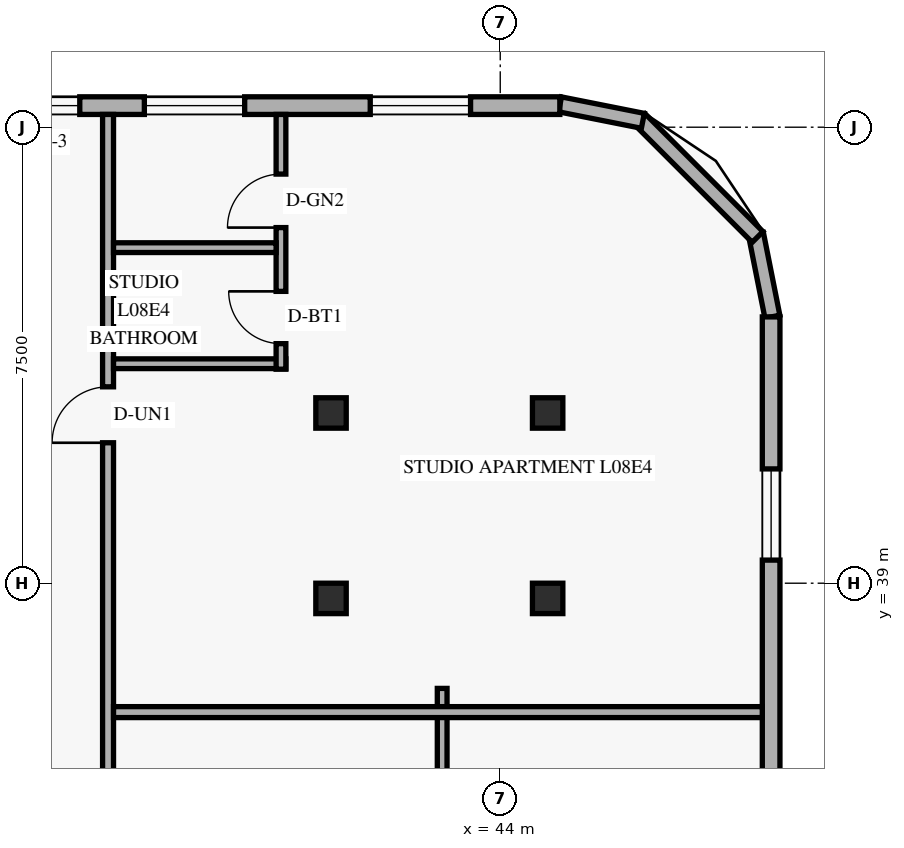
"""IFC4 building model, lengths in metres.
Left out: names, types, materials, properties, quantities, classifications, styles, units other than length and angle.
Written with IfcOpenShell. Run it as: python <this file> out.ifc"""

import sys

from ifc_helpers import new_model, si_unit, direction, frame, frame_2d, origin, origin_2d, place, context, subcontext, project, spatial, rectangle, hollow_rectangle, extrude, element, fill, save


model = new_model("IFC4")
c1 = context("Model", 3, precision=1e-05, world=origin(), true_north=direction((0.0, 1.0)))
c2 = subcontext(c1, "Body", "Model", "MODEL_VIEW")
j1 = project(units=[si_unit("LENGTHUNIT", "METRE"), si_unit("PLANEANGLEUNIT", "RADIAN")], contexts=[c1])
p1 = place(None, origin())
s1 = spatial("IfcSite", under=j1, at=p1, CompositionType="ELEMENT")
p2 = place(p1, origin())
s2 = spatial("IfcBuilding", under=s1, at=p2, CompositionType="ELEMENT")
p3 = place(p2, frame((0.0, 0.0, 34.8)))
s3 = spatial("IfcBuildingStorey", under=s2, at=p3, CompositionType="ELEMENT", Elevation=34.8)
for number, where, z_axis, x_axis in (
    (1, (41.154, 38.75, 0.0), (0.035, 0.0, 0.999), (0.0, 1.0, 0.0)),
    (2, (41.154, 41.8, 0.0), (0.035, 0.0, 0.999), (0.0, 1.0, 0.0)),
):
    element("IfcColumn", number, at=place(p3, frame(where, z_axis=z_axis, x_axis=x_axis)), inside=s3, PredefinedType="COLUMN", context=c2, shape_type="SweptSolid", body=[
        extrude(hollow_rectangle(XDim=0.5, YDim=0.5, WallThickness=0.022, at=origin_2d()), origin(), (0.0, 0.0, 1.0), 3.602),
    ])
for number, where, z_axis, x_axis in (
    (3, (44.675, 38.75, 0.0), (0.058, 0.0, 0.998), (0.0, 1.0, 0.0)),
    (4, (44.675, 41.8, 0.0), (0.058, 0.0, 0.998), (0.0, 1.0, 0.0)),
):
    element("IfcColumn", number, at=place(p3, frame(where, z_axis=z_axis, x_axis=x_axis)), inside=s3, PredefinedType="COLUMN", context=c2, shape_type="SweptSolid", body=[
        extrude(hollow_rectangle(XDim=0.5, YDim=0.5, WallThickness=0.022, at=origin_2d()), origin(), (0.0, 0.0, 1.0), 3.606),
    ])
p4 = place(p3, frame((48.476, 43.384, 0.0), z_axis=(0.0, 0.0, 1.0), x_axis=(-0.19496651342, 0.980809899341, 0.0)))
e5 = element("IfcWall", 5, at=p4, inside=s3, PredefinedType="SOLIDWALL", context=c2, shape_type="SweptSolid", body=[
    extrude(rectangle(XDim=1.389, YDim=0.25, at=frame_2d((0.694, 0.0))), origin(), (0.0, 0.0, 1.0), 3.36),
])
p5 = place(p3, frame((48.232, 44.695, 0.0), z_axis=(0.0, 0.0, 1.0), x_axis=(-0.707106781187, 0.707106781187, 0.0)))
e6 = element("IfcWall", 6, at=p5, inside=s3, PredefinedType="SOLIDWALL", context=c2, shape_type="SweptSolid", body=[
    extrude(rectangle(XDim=2.739, YDim=0.25, at=frame_2d((1.37, 0.0))), origin(), (0.0, 0.0, 1.0), 3.36),
])
p6 = place(p3, frame((46.345, 46.605, 0.0), z_axis=(0.0, 0.0, 1.0), x_axis=(-0.980809899341, 0.19496651342, 0.0)))
e7 = element("IfcWall", 7, at=p6, inside=s3, PredefinedType="SOLIDWALL", context=c2, shape_type="SweptSolid", body=[
    extrude(rectangle(XDim=1.389, YDim=0.25, at=frame_2d((0.694, 0.0))), origin(), (0.0, 0.0, 1.0), 3.36),
])
p7 = place(p3, frame((48.455, 29.4, 0.0), z_axis=(0.0, 0.0, 1.0), x_axis=(0.0, 1.0, 0.0)))
e8 = element("IfcWall", 8, at=p7, inside=s3, PredefinedType="SOLIDWALL", context=c2, shape_type="SweptSolid", body=[
    extrude(rectangle(XDim=13.98, YDim=0.29, at=frame_2d((6.99, 0.0))), origin(), (0.0, 0.0, 1.0), 3.36),
])
p8 = place(p7, frame((0.995, 0.0, 0.85)))
e9 = element("IfcOpeningElement", 9, at=p8, cuts=e8, PredefinedType="OPENING", context=c2, shape_type="SweptSolid", body=[
    extrude(rectangle(XDim=1.5, YDim=1.55, at=frame_2d((0.75, 0.775))), frame((0.0, 0.155, 0.0), z_axis=(0.0, -1.0, 0.0), x_axis=(1.0, 0.0, 0.0)), (0.0, 0.0, 1.0), 0.31),
])
p9 = place(p7, frame((4.735, 0.0, 0.85)))
e10 = element("IfcOpeningElement", 10, at=p9, cuts=e8, PredefinedType="OPENING", context=c2, shape_type="SweptSolid", body=[
    extrude(rectangle(XDim=1.5, YDim=1.55, at=frame_2d((0.75, 0.775))), frame((0.0, 0.155, 0.0), z_axis=(0.0, -1.0, 0.0), x_axis=(1.0, 0.0, 0.0)), (0.0, 0.0, 1.0), 0.31),
])
p10 = place(p7, frame((9.98, 0.0, 0.85)))
e11 = element("IfcOpeningElement", 11, at=p10, cuts=e8, PredefinedType="OPENING", context=c2, shape_type="SweptSolid", body=[
    extrude(rectangle(XDim=1.5, YDim=1.55, at=frame_2d((0.75, 0.775))), frame((0.0, 0.155, 0.0), z_axis=(0.0, -1.0, 0.0), x_axis=(1.0, 0.0, 0.0)), (0.0, 0.0, 1.0), 0.31),
])
p11 = place(p3, frame((44.98, 46.855, 0.0), z_axis=(0.0, 0.0, 1.0), x_axis=(-1.0, 0.0, 0.0)))
e12 = element("IfcWall", 12, at=p11, inside=s3, PredefinedType="SOLIDWALL", context=c2, shape_type="SweptSolid", body=[
    extrude(rectangle(XDim=39.56, YDim=0.29, at=frame_2d((19.78, 0.0))), origin(), (0.0, 0.0, 1.0), 3.36),
])
p12 = place(p11, frame((35.295, 0.0, 0.85)))
e13 = element("IfcOpeningElement", 13, at=p12, cuts=e12, PredefinedType="OPENING", context=c2, shape_type="SweptSolid", body=[
    extrude(rectangle(XDim=1.65, YDim=1.6, at=frame_2d((0.825, 0.8))), frame((0.0, 0.155, 0.0), z_axis=(0.0, -1.0, 0.0), x_axis=(1.0, 0.0, 0.0)), (0.0, 0.0, 1.0), 0.31),
])
p13 = place(p11, frame((31.18, 0.0, 0.85)))
e14 = element("IfcOpeningElement", 14, at=p13, cuts=e12, PredefinedType="OPENING", context=c2, shape_type="SweptSolid", body=[
    extrude(rectangle(XDim=1.2, YDim=1.5, at=frame_2d((0.6, 0.75))), frame((0.0, 0.155, 0.0), z_axis=(0.0, -1.0, 0.0), x_axis=(1.0, 0.0, 0.0)), (0.0, 0.0, 1.0), 0.31),
])
p14 = place(p11, frame((25.684, 0.0, 0.85)))
e15 = element("IfcOpeningElement", 15, at=p14, cuts=e12, PredefinedType="OPENING", context=c2, shape_type="SweptSolid", body=[
    extrude(rectangle(XDim=1.65, YDim=1.6, at=frame_2d((0.825, 0.8))), frame((0.0, 0.155, 0.0), z_axis=(0.0, -1.0, 0.0), x_axis=(1.0, 0.0, 0.0)), (0.0, 0.0, 1.0), 0.31),
])
p15 = place(p11, frame((18.649, 0.0, 0.85)))
e16 = element("IfcOpeningElement", 16, at=p15, cuts=e12, PredefinedType="OPENING", context=c2, shape_type="SweptSolid", body=[
    extrude(rectangle(XDim=1.65, YDim=1.6, at=frame_2d((0.825, 0.8))), frame((0.0, 0.155, 0.0), z_axis=(0.0, -1.0, 0.0), x_axis=(1.0, 0.0, 0.0)), (0.0, 0.0, 1.0), 0.31),
])
p16 = place(p11, frame((12.359, 0.0, 0.85)))
e17 = element("IfcOpeningElement", 17, at=p16, cuts=e12, PredefinedType="OPENING", context=c2, shape_type="SweptSolid", body=[
    extrude(rectangle(XDim=1.65, YDim=1.6, at=frame_2d((0.825, 0.8))), frame((0.0, 0.155, 0.0), z_axis=(0.0, -1.0, 0.0), x_axis=(1.0, 0.0, 0.0)), (0.0, 0.0, 1.0), 0.31),
])
p17 = place(p11, frame((7.895, 0.0, 0.85)))
e18 = element("IfcOpeningElement", 18, at=p17, cuts=e12, PredefinedType="OPENING", context=c2, shape_type="SweptSolid", body=[
    extrude(rectangle(XDim=1.2, YDim=1.5, at=frame_2d((0.6, 0.75))), frame((0.0, 0.155, 0.0), z_axis=(0.0, -1.0, 0.0), x_axis=(1.0, 0.0, 0.0)), (0.0, 0.0, 1.0), 0.31),
])
p18 = place(p11, frame((5.183, 0.0, 0.85)))
e19 = element("IfcOpeningElement", 19, at=p18, cuts=e12, PredefinedType="OPENING", context=c2, shape_type="SweptSolid", body=[
    extrude(rectangle(XDim=1.65, YDim=1.6, at=frame_2d((0.825, 0.8))), frame((0.0, 0.155, 0.0), z_axis=(0.0, -1.0, 0.0), x_axis=(1.0, 0.0, 0.0)), (0.0, 0.0, 1.0), 0.31),
])
p19 = place(p11, frame((1.468, 0.0, 0.85)))
e20 = element("IfcOpeningElement", 20, at=p19, cuts=e12, PredefinedType="OPENING", context=c2, shape_type="SweptSolid", body=[
    extrude(rectangle(XDim=1.65, YDim=1.6, at=frame_2d((0.825, 0.8))), frame((0.0, 0.155, 0.0), z_axis=(0.0, -1.0, 0.0), x_axis=(1.0, 0.0, 0.0)), (0.0, 0.0, 1.0), 0.31),
])
p20 = place(p3, frame((37.55, 1.29, 0.0), z_axis=(0.0, 0.0, 1.0), x_axis=(0.0, 1.0, 0.0)))
e21 = element("IfcWall", 21, at=p20, inside=s3, PredefinedType="STANDARD", context=c2, shape_type="SweptSolid", body=[
    extrude(rectangle(XDim=45.42, YDim=0.18, at=frame_2d((22.71, 0.0))), origin(), (0.0, 0.0, 1.0), 2.649),
])
p21 = place(p20, frame((4.46, 0.0, 0.0)))
e22 = element("IfcOpeningElement", 22, at=p21, cuts=e21, PredefinedType="OPENING", context=c2, shape_type="SweptSolid", body=[
    extrude(rectangle(XDim=0.92, YDim=2.15, at=frame_2d((0.46, 1.075))), frame((0.0, 0.1, 0.0), z_axis=(0.0, -1.0, 0.0), x_axis=(1.0, 0.0, 0.0)), (0.0, 0.0, 1.0), 0.2),
])
p22 = place(p20, frame((15.907, 0.0, 0.0)))
e23 = element("IfcOpeningElement", 23, at=p22, cuts=e21, PredefinedType="OPENING", context=c2, shape_type="SweptSolid", body=[
    extrude(rectangle(XDim=0.92, YDim=2.15, at=frame_2d((0.46, 1.075))), frame((0.0, 0.1, 0.0), z_axis=(0.0, -1.0, 0.0), x_axis=(1.0, 0.0, 0.0)), (0.0, 0.0, 1.0), 0.2),
])
p23 = place(p20, frame((28.23, 0.0, 0.0)))
e24 = element("IfcOpeningElement", 24, at=p23, cuts=e21, PredefinedType="OPENING", context=c2, shape_type="SweptSolid", body=[
    extrude(rectangle(XDim=0.92, YDim=2.15, at=frame_2d((0.46, 1.075))), frame((0.0, 0.1, 0.0), z_axis=(0.0, -1.0, 0.0), x_axis=(1.0, 0.0, 0.0)), (0.0, 0.0, 1.0), 0.2),
])
p24 = place(p20, frame((40.02, 0.0, 0.0)))
e25 = element("IfcOpeningElement", 25, at=p24, cuts=e21, PredefinedType="OPENING", context=c2, shape_type="SweptSolid", body=[
    extrude(rectangle(XDim=0.92, YDim=2.15, at=frame_2d((0.46, 1.075))), frame((0.0, 0.1, 0.0), z_axis=(0.0, -1.0, 0.0), x_axis=(1.0, 0.0, 0.0)), (0.0, 0.0, 1.0), 0.2),
])
p25 = place(p3, frame((43.045, 32.81, 0.0), z_axis=(0.0, 0.0, 1.0), x_axis=(0.0, 1.0, 0.0)))
e26 = element("IfcWall", 26, at=p25, inside=s3, PredefinedType="PARTITIONING", context=c2, shape_type="SweptSolid", body=[
    extrude(rectangle(XDim=4.46, YDim=0.16, at=frame_2d((2.23, 0.0))), origin(), (0.0, 0.0, 1.0), 2.932),
])
p26 = place(p3, frame((37.64, 36.88, 0.0), z_axis=(0.0, 0.0, 1.0), x_axis=(1.0, 0.0, 0.0)))
e27 = element("IfcWall", 27, at=p26, inside=s3, PredefinedType="PARTITIONING", context=c2, shape_type="SweptSolid", body=[
    extrude(rectangle(XDim=10.67, YDim=0.18, at=frame_2d((5.335, 0.0))), origin(), (0.0, 0.0, 1.0), 2.649),
])
p27 = place(p3, frame((37.64, 42.61, 0.0), z_axis=(0.0, 0.0, 1.0), x_axis=(1.0, 0.0, 0.0)))
e28 = element("IfcWall", 28, at=p27, inside=s3, PredefinedType="PLUMBINGWALL", context=c2, shape_type="SweptSolid", body=[
    extrude(rectangle(XDim=2.834, YDim=0.16, at=frame_2d((1.417, 0.0))), origin(), (0.0, 0.0, 1.0), 3.36),
])
p28 = place(p3, frame((40.394, 42.52, 0.0), z_axis=(0.0, 0.0, 1.0), x_axis=(0.0, 1.0, 0.0)))
e29 = element("IfcWall", 29, at=p28, inside=s3, PredefinedType="PLUMBINGWALL", context=c2, shape_type="SweptSolid", body=[
    extrude(rectangle(XDim=4.19, YDim=0.16, at=frame_2d((2.095, 0.0))), origin(), (0.0, 0.0, 1.0), 3.36),
])
p29 = place(p28, frame((0.42, 0.0, 0.0)))
e30 = element("IfcOpeningElement", 30, at=p29, cuts=e29, PredefinedType="OPENING", context=c2, shape_type="SweptSolid", body=[
    extrude(rectangle(XDim=0.86, YDim=2.12, at=frame_2d((0.43, 1.06))), frame((0.0, 0.09, 0.0), z_axis=(0.0, -1.0, 0.0), x_axis=(1.0, 0.0, 0.0)), (0.0, 0.0, 1.0), 0.18),
])
p30 = place(p28, frame((2.329, 0.0, 0.0)))
e31 = element("IfcOpeningElement", 31, at=p30, cuts=e29, PredefinedType="OPENING", context=c2, shape_type="SweptSolid", body=[
    extrude(rectangle(XDim=0.88, YDim=2.12, at=frame_2d((0.44, 1.06))), frame((0.0, 0.09, 0.0), z_axis=(0.0, -1.0, 0.0), x_axis=(1.0, 0.0, 0.0)), (0.0, 0.0, 1.0), 0.18),
])
p31 = place(p3, frame((37.64, 44.519, 0.0), z_axis=(0.0, 0.0, 1.0), x_axis=(1.0, 0.0, 0.0)))
e32 = element("IfcWall", 32, at=p31, inside=s3, PredefinedType="PLUMBINGWALL", context=c2, shape_type="SweptSolid", body=[
    extrude(rectangle(XDim=2.674, YDim=0.16, at=frame_2d((1.337, 0.0))), origin(), (0.0, 0.0, 1.0), 3.36),
])
p32 = place(p10, origin())
e33 = element("IfcWindow", 33, at=p32, inside=s3, PartitioningType="SINGLE_PANEL", PredefinedType="WINDOW", context=c2, shape_type="SweptSolid", body=[
    extrude(rectangle(XDim=1.5, YDim=1.55, at=frame_2d((0.75, 0.775))), frame((0.0, 0.03, 0.0), z_axis=(0.0, -1.0, 0.0), x_axis=(1.0, 0.0, 0.0)), (0.0, 0.0, 1.0), 0.06),
])
fill(e11, e33)
p33 = place(p17, origin())
e34 = element("IfcWindow", 34, at=p33, inside=s3, PartitioningType="SINGLE_PANEL", PredefinedType="WINDOW", context=c2, shape_type="SweptSolid", body=[
    extrude(rectangle(XDim=1.2, YDim=1.5, at=frame_2d((0.6, 0.75))), frame((0.0, 0.03, 0.0), z_axis=(0.0, -1.0, 0.0), x_axis=(1.0, 0.0, 0.0)), (0.0, 0.0, 1.0), 0.06),
])
fill(e18, e34)
p34 = place(p18, origin())
e35 = element("IfcWindow", 35, at=p34, inside=s3, PartitioningType="SINGLE_PANEL", PredefinedType="WINDOW", context=c2, shape_type="SweptSolid", body=[
    extrude(rectangle(XDim=1.65, YDim=1.6, at=frame_2d((0.825, 0.8))), frame((0.0, 0.03, 0.0), z_axis=(0.0, -1.0, 0.0), x_axis=(1.0, 0.0, 0.0)), (0.0, 0.0, 1.0), 0.06),
])
fill(e19, e35)
p35 = place(p19, origin())
e36 = element("IfcWindow", 36, at=p35, inside=s3, PartitioningType="SINGLE_PANEL", PredefinedType="WINDOW", context=c2, shape_type="SweptSolid", body=[
    extrude(rectangle(XDim=1.65, YDim=1.6, at=frame_2d((0.825, 0.8))), frame((0.0, 0.03, 0.0), z_axis=(0.0, -1.0, 0.0), x_axis=(1.0, 0.0, 0.0)), (0.0, 0.0, 1.0), 0.06),
])
fill(e20, e36)
p36 = place(p24, origin())
e37 = element("IfcDoor", 37, at=p36, inside=s3, OperationType="SINGLE_SWING_LEFT", PredefinedType="DOOR", context=c2, shape_type="SweptSolid", body=[
    extrude(rectangle(XDim=0.92, YDim=2.15, at=frame_2d((0.46, 1.075))), frame((0.0, 0.025, 0.0), z_axis=(0.0, -1.0, 0.0), x_axis=(1.0, 0.0, 0.0)), (0.0, 0.0, 1.0), 0.05),
])
fill(e25, e37)
p37 = place(p29, origin())
e38 = element("IfcDoor", 38, at=p37, inside=s3, OperationType="SINGLE_SWING_RIGHT", PredefinedType="DOOR", context=c2, shape_type="SweptSolid", body=[
    extrude(rectangle(XDim=0.86, YDim=2.12, at=frame_2d((0.43, 1.06))), frame((0.0, 0.025, 0.0), z_axis=(0.0, -1.0, 0.0), x_axis=(1.0, 0.0, 0.0)), (0.0, 0.0, 1.0), 0.05),
])
fill(e30, e38)
p38 = place(p30, origin())
e39 = element("IfcDoor", 39, at=p38, inside=s3, OperationType="SINGLE_SWING_LEFT", PredefinedType="DOOR", context=c2, shape_type="SweptSolid", body=[
    extrude(rectangle(XDim=0.88, YDim=2.12, at=frame_2d((0.44, 1.06))), frame((0.0, 0.025, 0.0), z_axis=(0.0, -1.0, 0.0), x_axis=(1.0, 0.0, 0.0)), (0.0, 0.0, 1.0), 0.05),
])
fill(e31, e39)
save(model, sys.argv[1])
